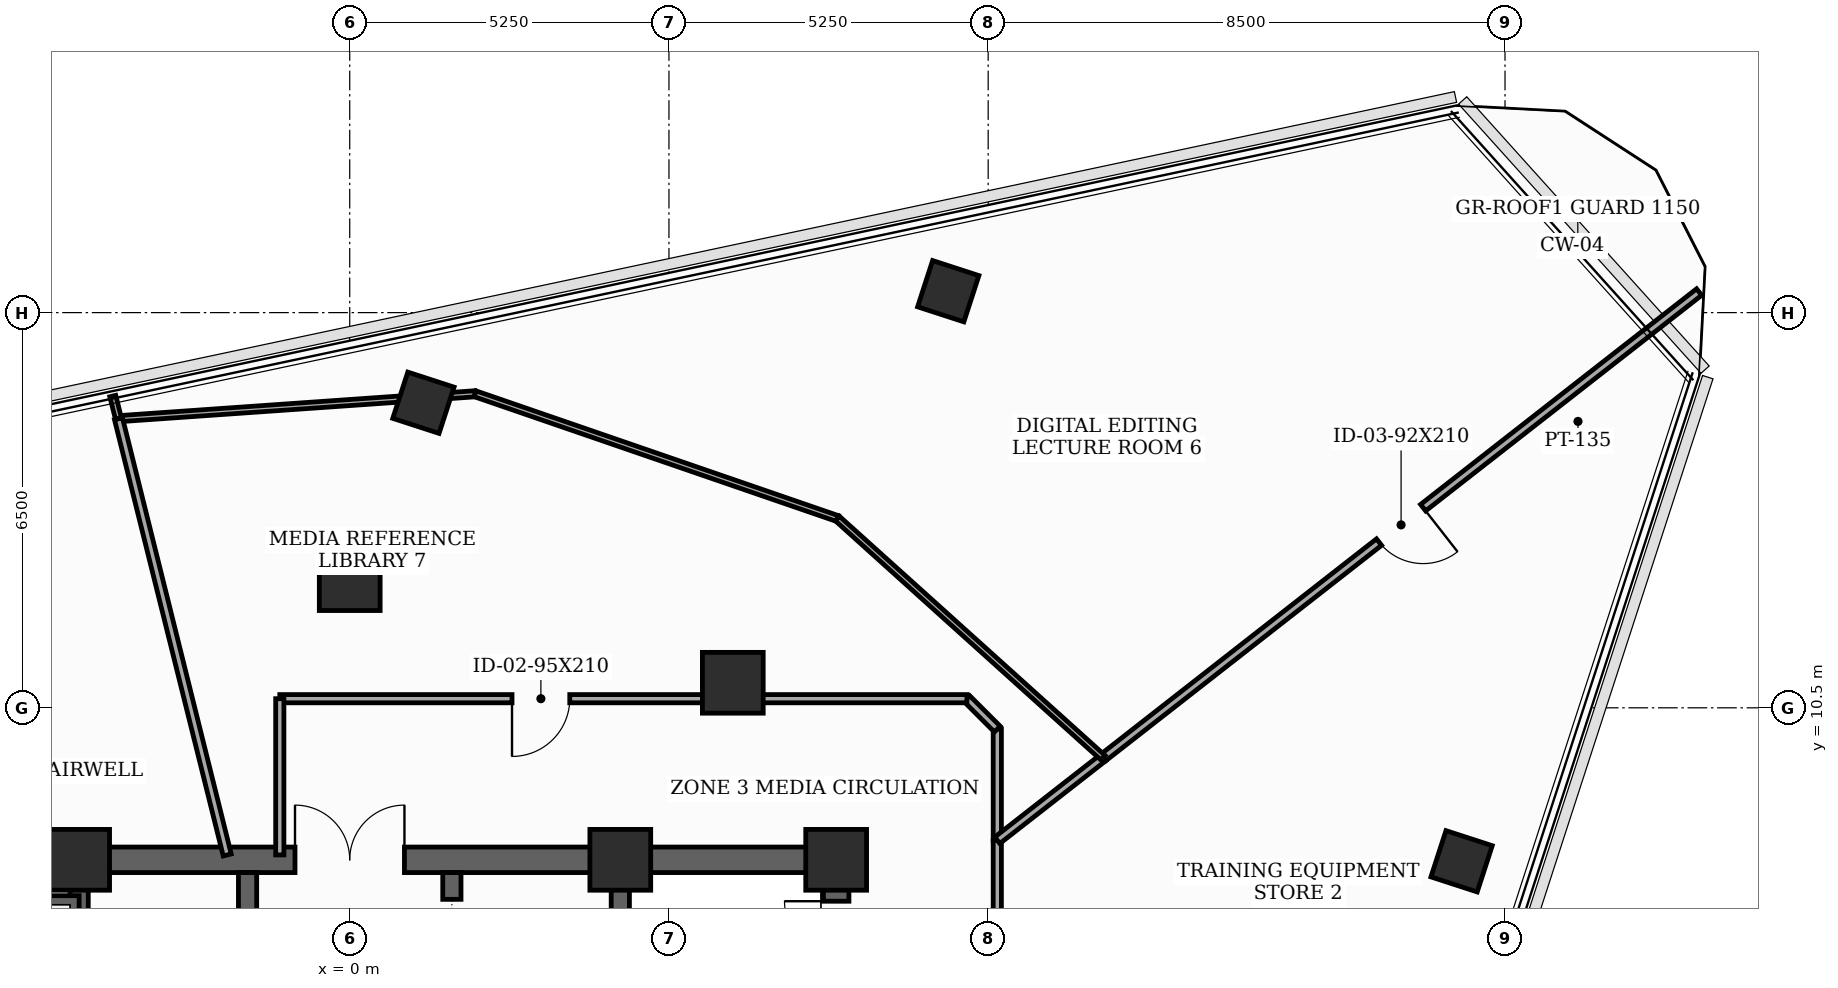
"""IFC4 building model, lengths in metres.
Left out: names, types, materials, properties, quantities, classifications, styles, units other than length and angle.
Written with IfcOpenShell. Run it as: python <this file> out.ifc"""

import sys

from ifc_helpers import new_model, si_unit, direction, frame, frame_2d, origin, origin_2d, place, context, subcontext, project, spatial, rectangle, extrude, element, fill, save


model = new_model("IFC4")
c1 = context("Model", 3, precision=1e-05, world=origin(), true_north=direction((0.0, 1.0)))
c2 = subcontext(c1, "Body", "Model", "MODEL_VIEW")
j1 = project(units=[si_unit("LENGTHUNIT", "METRE"), si_unit("PLANEANGLEUNIT", "RADIAN")], contexts=[c1])
p1 = place(None, origin())
s1 = spatial("IfcSite", under=j1, at=p1, CompositionType="ELEMENT")
p2 = place(p1, origin())
s2 = spatial("IfcBuilding", under=s1, at=p2, CompositionType="ELEMENT")
p3 = place(p2, frame((0.0, 0.0, 286.9)))
s3 = spatial("IfcBuildingStorey", under=s2, at=p3, CompositionType="ELEMENT", Elevation=286.9)
for number, where, z_axis, x_axis in (
    (1, (8.0, 8.0, 0.0), (0.0, 0.0, 1.0), (1.0, 0.0, 0.0)),
    (2, (4.45, 8.0, 0.0), (0.0, 0.0, 1.0), (1.0, 0.0, 0.0)),
    (3, (-4.45, 8.0, 0.0), (0.0, 0.0, 1.0), (1.0, 0.0, 0.0)),
    (4, (6.3, 10.912, 0.0), (0.0, 0.0, 1.0), (1.0, 0.0, 0.0)),
    (5, (0.0, 12.6, 0.0), (0.0, 0.0, 1.0), (1.0, 0.0, 0.0)),
):
    element("IfcColumn", number, at=place(p3, frame(where, z_axis=z_axis, x_axis=x_axis)), inside=s3, PredefinedType="COLUMN", context=c2, shape_type="SweptSolid", body=[
        extrude(rectangle(XDim=1.0, YDim=1.0, at=origin_2d()), origin(), (0.0, 0.0, 1.0), 3.7),
    ])
for number, where, z_axis, x_axis in (
    (6, (18.286, 7.976, 0.0), (0.0, 0.0, 1.0), (0.309, 0.951, 0.0)),
    (7, (9.844, 17.352, 0.0), (0.0, 0.0, 1.0), (0.309, 0.951, 0.0)),
    (8, (1.212, 15.518, 0.0), (0.0, 0.0, 1.0), (0.309, 0.951, 0.0)),
):
    element("IfcColumn", number, at=place(p3, frame(where, z_axis=z_axis, x_axis=x_axis)), inside=s3, PredefinedType="COLUMN", context=c2, shape_type="SweptSolid", body=[
        extrude(rectangle(XDim=0.8, YDim=0.8, at=origin_2d()), origin(), (0.0, 0.0, 1.0), 3.7),
    ])
p4 = place(p3, frame((8.0, -8.0, 0.0), z_axis=(0.0, 0.0, 1.0), x_axis=(0.0, 1.0, 0.0)))
e9 = element("IfcWall", 9, at=p4, inside=s3, PredefinedType="SHEAR", context=c2, shape_type="SweptSolid", body=[
    extrude(rectangle(XDim=16.0, YDim=0.42, at=frame_2d((8.0, 0.0))), origin(), (0.0, 0.0, 1.0), 3.5),
])
p5 = place(p4, frame((9.6, 0.0, 0.0)))
e10 = element("IfcOpeningElement", 10, at=p5, cuts=e9, PredefinedType="OPENING", context=c2, shape_type="SweptSolid", body=[
    extrude(rectangle(XDim=1.05, YDim=2.15, at=frame_2d((0.525, 1.075))), frame((0.0, 0.22, 0.0), z_axis=(0.0, -1.0, 0.0), x_axis=(1.0, 0.0, 0.0)), (0.0, 0.0, 1.0), 0.44),
])
p6 = place(p4, frame((14.469, 0.0, 0.0)))
e11 = element("IfcOpeningElement", 11, at=p6, cuts=e9, PredefinedType="OPENING", context=c2, shape_type="SweptSolid", body=[
    extrude(rectangle(XDim=0.85, YDim=2.02, at=frame_2d((0.425, 1.01))), frame((0.0, 0.22, 0.0), z_axis=(0.0, -1.0, 0.0), x_axis=(1.0, 0.0, 0.0)), (0.0, 0.0, 1.0), 0.44),
])
p7 = place(p3, frame((-8.0, 8.0, 0.0), z_axis=(0.0, 0.0, 1.0), x_axis=(1.0, 0.0, 0.0)))
e12 = element("IfcWall", 12, at=p7, inside=s3, PredefinedType="SHEAR", context=c2, shape_type="SweptSolid", body=[
    extrude(rectangle(XDim=16.0, YDim=0.42, at=frame_2d((8.0, 0.0))), origin(), (0.0, 0.0, 1.0), 3.5),
])
p8 = place(p7, frame((7.1, 0.0, 0.0)))
e13 = element("IfcOpeningElement", 13, at=p8, cuts=e12, PredefinedType="OPENING", context=c2, shape_type="SweptSolid", body=[
    extrude(rectangle(XDim=1.8, YDim=2.15, at=frame_2d((0.9, 1.075))), frame((0.0, 0.22, 0.0), z_axis=(0.0, -1.0, 0.0), x_axis=(1.0, 0.0, 0.0)), (0.0, 0.0, 1.0), 0.44),
])
for number, where, z_axis, x_axis in (
    (14, (-4.45, -7.79, 0.0), (0.0, 0.0, 1.0), (0.0, 1.0, 0.0)),
    (15, (4.45, -7.79, 0.0), (0.0, 0.0, 1.0), (0.0, 1.0, 0.0)),
):
    element("IfcWall", number, at=place(p3, frame(where, z_axis=z_axis, x_axis=x_axis)), inside=s3, PredefinedType="SHEAR", context=c2, shape_type="SweptSolid", body=[
        extrude(rectangle(XDim=15.58, YDim=0.3, at=frame_2d((7.79, 0.0))), origin(), (0.0, 0.0, 1.0), 3.5),
    ])
p9 = place(p3, frame((-7.79, 7.26, 0.0), z_axis=(0.0, 0.0, 1.0), x_axis=(1.0, 0.0, 0.0)))
e16 = element("IfcWall", 16, at=p9, inside=s3, PredefinedType="SHEAR", context=c2, shape_type="SweptSolid", body=[
    extrude(rectangle(XDim=3.34, YDim=0.3, at=frame_2d((1.67, 0.0))), origin(), (0.0, 0.0, 1.0), 3.5),
])
p10 = place(p3, frame((-1.68, -4.85, 0.0), z_axis=(0.0, 0.0, 1.0), x_axis=(0.0, 1.0, 0.0)))
e17 = element("IfcWall", 17, at=p10, inside=s3, PredefinedType="SHEAR", context=c2, shape_type="SweptSolid", body=[
    extrude(rectangle(XDim=12.64, YDim=0.3, at=frame_2d((6.32, 0.0))), origin(), (0.0, 0.0, 1.0), 3.5),
])
p11 = place(p10, frame((2.6, 0.0, 0.0)))
e18 = element("IfcOpeningElement", 18, at=p11, cuts=e17, PredefinedType="OPENING", context=c2, shape_type="SweptSolid", body=[
    extrude(rectangle(XDim=0.95, YDim=2.1, at=frame_2d((0.475, 1.05))), frame((0.0, 0.16, 0.0), z_axis=(0.0, -1.0, 0.0), x_axis=(1.0, 0.0, 0.0)), (0.0, 0.0, 1.0), 0.32),
])
p12 = place(p10, frame((8.8, 0.0, 0.0)))
e19 = element("IfcOpeningElement", 19, at=p12, cuts=e17, PredefinedType="OPENING", context=c2, shape_type="SweptSolid", body=[
    extrude(rectangle(XDim=0.95, YDim=2.1, at=frame_2d((0.475, 1.05))), frame((0.0, 0.16, 0.0), z_axis=(0.0, -1.0, 0.0), x_axis=(1.0, 0.0, 0.0)), (0.0, 0.0, 1.0), 0.32),
])
p13 = place(p3, frame((1.68, -4.85, 0.0), z_axis=(0.0, 0.0, 1.0), x_axis=(0.0, 1.0, 0.0)))
e20 = element("IfcWall", 20, at=p13, inside=s3, PredefinedType="SHEAR", context=c2, shape_type="SweptSolid", body=[
    extrude(rectangle(XDim=12.64, YDim=0.3, at=frame_2d((6.32, 0.0))), origin(), (0.0, 0.0, 1.0), 3.5),
])
p14 = place(p13, frame((0.55, 0.0, 0.0)))
e21 = element("IfcOpeningElement", 21, at=p14, cuts=e20, PredefinedType="OPENING", context=c2, shape_type="SweptSolid", body=[
    extrude(rectangle(XDim=1.1, YDim=2.1, at=frame_2d((0.55, 1.05))), frame((0.0, 0.16, 0.0), z_axis=(0.0, -1.0, 0.0), x_axis=(1.0, 0.0, 0.0)), (0.0, 0.0, 1.0), 0.32),
])
p15 = place(p13, frame((2.65, 0.0, 0.0)))
e22 = element("IfcOpeningElement", 22, at=p15, cuts=e20, PredefinedType="OPENING", context=c2, shape_type="SweptSolid", body=[
    extrude(rectangle(XDim=1.1, YDim=2.1, at=frame_2d((0.55, 1.05))), frame((0.0, 0.16, 0.0), z_axis=(0.0, -1.0, 0.0), x_axis=(1.0, 0.0, 0.0)), (0.0, 0.0, 1.0), 0.32),
])
p16 = place(p13, frame((4.75, 0.0, 0.0)))
e23 = element("IfcOpeningElement", 23, at=p16, cuts=e20, PredefinedType="OPENING", context=c2, shape_type="SweptSolid", body=[
    extrude(rectangle(XDim=1.1, YDim=2.1, at=frame_2d((0.55, 1.05))), frame((0.0, 0.16, 0.0), z_axis=(0.0, -1.0, 0.0), x_axis=(1.0, 0.0, 0.0)), (0.0, 0.0, 1.0), 0.32),
])
p17 = place(p13, frame((8.2, 0.0, 0.0)))
e24 = element("IfcOpeningElement", 24, at=p17, cuts=e20, PredefinedType="OPENING", context=c2, shape_type="SweptSolid", body=[
    extrude(rectangle(XDim=0.95, YDim=2.1, at=frame_2d((0.475, 1.05))), frame((0.0, 0.16, 0.0), z_axis=(0.0, -1.0, 0.0), x_axis=(1.0, 0.0, 0.0)), (0.0, 0.0, 1.0), 0.32),
])
p18 = place(p13, frame((11.25, 0.0, 0.0)))
e25 = element("IfcOpeningElement", 25, at=p18, cuts=e20, PredefinedType="OPENING", context=c2, shape_type="SweptSolid", body=[
    extrude(rectangle(XDim=0.95, YDim=2.1, at=frame_2d((0.475, 1.05))), frame((0.0, 0.16, 0.0), z_axis=(0.0, -1.0, 0.0), x_axis=(1.0, 0.0, 0.0)), (0.0, 0.0, 1.0), 0.32),
])
p19 = place(p3, frame((10.65, 4.225, 0.0), z_axis=(0.0, 0.0, 1.0), x_axis=(0.0, 1.0, 0.0)))
e26 = element("IfcWall", 26, at=p19, inside=s3, PredefinedType="PARTITIONING", context=c2, shape_type="SweptSolid", body=[
    extrude(rectangle(XDim=4.096, YDim=0.135, at=frame_2d((2.048, 0.0))), origin(), (0.0, 0.0, 1.0), 2.885),
])
p20 = place(p3, frame((10.65, 8.321, 0.0), z_axis=(0.0, 0.0, 1.0), x_axis=(0.0, 1.0, 0.0)))
e27 = element("IfcWall", 27, at=p20, inside=s3, PredefinedType="PARTITIONING", context=c2, shape_type="SweptSolid", body=[
    extrude(rectangle(XDim=1.829, YDim=0.135, at=frame_2d((0.915, 0.0))), origin(), (0.0, 0.0, 1.0), 3.5),
])
p21 = place(p3, frame((10.65, 10.15, 0.0), z_axis=(0.0, 0.0, 1.0), x_axis=(-0.707106781187, 0.707106781187, 0.0)))
e28 = element("IfcWall", 28, at=p21, inside=s3, PredefinedType="PARTITIONING", context=c2, shape_type="SweptSolid", body=[
    extrude(rectangle(XDim=0.707, YDim=0.135, at=frame_2d((0.354, 0.0))), origin(), (0.0, 0.0, 1.0), 3.5),
])
p22 = place(p3, frame((10.15, 10.65, 0.0), z_axis=(0.0, 0.0, 1.0), x_axis=(-1.0, 0.0, 0.0)))
e29 = element("IfcWall", 29, at=p22, inside=s3, PredefinedType="PARTITIONING", context=c2, shape_type="SweptSolid", body=[
    extrude(rectangle(XDim=11.3, YDim=0.135, at=frame_2d((5.65, 0.0))), origin(), (0.0, 0.0, 1.0), 2.885),
])
p23 = place(p22, frame((6.531, 0.0, 0.0)))
e30 = element("IfcOpeningElement", 30, at=p23, cuts=e29, PredefinedType="OPENING", context=c2, shape_type="SweptSolid", body=[
    extrude(rectangle(XDim=0.95, YDim=2.1, at=frame_2d((0.475, 1.05))), frame((0.0, 0.077, 0.0), z_axis=(0.0, -1.0, 0.0), x_axis=(1.0, 0.0, 0.0)), (0.0, 0.0, 1.0), 0.155),
])
p24 = place(p3, frame((-1.15, 10.65, 0.0), z_axis=(0.0, 0.0, 1.0), x_axis=(0.0, -1.0, 0.0)))
e31 = element("IfcWall", 31, at=p24, inside=s3, PredefinedType="PARTITIONING", context=c2, shape_type="SweptSolid", body=[
    extrude(rectangle(XDim=2.57, YDim=0.135, at=frame_2d((1.285, 0.0))), origin(), (0.0, 0.0, 1.0), 2.885),
])
p25 = place(p3, frame((22.192, 17.338, 0.0), z_axis=(0.0, 0.0, 1.0), x_axis=(-0.788006224946, -0.615667271703, 0.0)))
e32 = element("IfcWall", 32, at=p25, inside=s3, PredefinedType="PARTITIONING", context=c2, shape_type="SweptSolid", body=[
    extrude(rectangle(XDim=12.441, YDim=0.135, at=frame_2d((6.22, 0.0))), origin(), (0.0, 0.0, 1.0), 3.035),
])
p26 = place(p25, frame((5.76, 0.0, 0.0)))
e33 = element("IfcOpeningElement", 33, at=p26, cuts=e32, PredefinedType="OPENING", context=c2, shape_type="SweptSolid", body=[
    extrude(rectangle(XDim=0.92, YDim=2.1, at=frame_2d((0.46, 1.05))), frame((0.0, 0.077, 0.0), z_axis=(0.0, -1.0, 0.0), x_axis=(1.0, 0.0, 0.0)), (0.0, 0.0, 1.0), 0.155),
])
p27 = place(p3, frame((12.389, 9.679, 0.0), z_axis=(0.0, 0.0, 1.0), x_axis=(-0.788177008199, -0.615448619908, 0.0)))
e34 = element("IfcWall", 34, at=p27, inside=s3, PredefinedType="PARTITIONING", context=c2, shape_type="SweptSolid", body=[
    extrude(rectangle(XDim=2.206, YDim=0.135, at=frame_2d((1.103, 0.0))), origin(), (0.0, 0.0, 1.0), 3.5),
])
p28 = place(p3, frame((-3.803, 15.255, 0.0), z_axis=(0.0, 0.0, 1.0), x_axis=(0.997563622011, 0.069762597718, 0.0)))
e35 = element("IfcWall", 35, at=p28, inside=s3, PredefinedType="MOVABLE", context=c2, shape_type="SweptSolid", body=[
    extrude(rectangle(XDim=5.879, YDim=0.1, at=frame_2d((2.94, 0.0))), origin(), (0.0, 0.0, 1.0), 3.025),
])
p29 = place(p3, frame((2.062, 15.665, 0.0), z_axis=(0.0, 0.0, 1.0), x_axis=(0.94552565825, -0.32554758422, 0.0)))
e36 = element("IfcWall", 36, at=p29, inside=s3, PredefinedType="MOVABLE", context=c2, shape_type="SweptSolid", body=[
    extrude(rectangle(XDim=6.3, YDim=0.1, at=frame_2d((3.15, 0.0))), origin(), (0.0, 0.0, 1.0), 3.025),
])
p30 = place(p3, frame((8.019, 13.614, 0.0), z_axis=(0.0, 0.0, 1.0), x_axis=(0.743110388877, -0.669168850099, 0.0)))
e37 = element("IfcWall", 37, at=p30, inside=s3, PredefinedType="MOVABLE", context=c2, shape_type="SweptSolid", body=[
    extrude(rectangle(XDim=5.881, YDim=0.1, at=frame_2d((2.94, 0.0))), origin(), (0.0, 0.0, 1.0), 3.035),
])
p31 = place(p3, frame((-3.897, 15.628, 0.0), z_axis=(0.0, 0.0, 1.0), x_axis=(0.24388032021, -0.969805335835, 0.0)))
e38 = element("IfcWall", 38, at=p31, inside=s3, PredefinedType="MOVABLE", context=c2, shape_type="SweptSolid", body=[
    extrude(rectangle(XDim=0.385, YDim=0.1, at=frame_2d((0.192, 0.0))), origin(), (0.0, 0.0, 1.0), 3.5),
])
p32 = place(p3, frame((-3.803, 15.255, 0.0), z_axis=(0.0, 0.0, 1.0), x_axis=(0.241851911951, -0.970313172479, 0.0)))
e39 = element("IfcWall", 39, at=p32, inside=s3, PredefinedType="PARTITIONING", context=c2, shape_type="SweptSolid", body=[
    extrude(rectangle(XDim=7.394, YDim=0.135, at=frame_2d((3.697, 0.0))), origin(), (0.0, 0.0, 1.0), 2.885),
])
p33 = place(p6, origin())
e40 = element("IfcDoor", 40, at=p33, inside=s3, OperationType="SINGLE_SWING_RIGHT", PredefinedType="TRAPDOOR", context=c2, shape_type="SweptSolid", body=[
    extrude(rectangle(XDim=0.85, YDim=2.02, at=frame_2d((0.425, 1.01))), frame((0.0, 0.025, 0.0), z_axis=(0.0, -1.0, 0.0), x_axis=(1.0, 0.0, 0.0)), (0.0, 0.0, 1.0), 0.05),
])
fill(e11, e40)
p34 = place(p8, origin())
e41 = element("IfcDoor", 41, at=p34, inside=s3, OperationType="DOUBLE_DOOR_SINGLE_SWING", PredefinedType="DOOR", context=c2, shape_type="SweptSolid", body=[
    extrude(rectangle(XDim=1.8, YDim=2.15, at=frame_2d((0.9, 1.075))), frame((0.0, 0.025, 0.0), z_axis=(0.0, -1.0, 0.0), x_axis=(1.0, 0.0, 0.0)), (0.0, 0.0, 1.0), 0.05),
])
fill(e13, e41)
p35 = place(p18, origin())
e42 = element("IfcDoor", 42, at=p35, inside=s3, OperationType="SLIDING_TO_LEFT", PredefinedType="DOOR", context=c2, shape_type="SweptSolid", body=[
    extrude(rectangle(XDim=0.95, YDim=2.1, at=frame_2d((0.475, 1.05))), frame((0.0, 0.025, 0.0), z_axis=(0.0, -1.0, 0.0), x_axis=(1.0, 0.0, 0.0)), (0.0, 0.0, 1.0), 0.05),
])
fill(e25, e42)
p36 = place(p23, origin())
e43 = element("IfcDoor", 43, at=p36, inside=s3, OperationType="SINGLE_SWING_RIGHT", PredefinedType="DOOR", context=c2, shape_type="SweptSolid", body=[
    extrude(rectangle(XDim=0.95, YDim=2.1, at=frame_2d((0.475, 1.05))), frame((0.0, 0.025, 0.0), z_axis=(0.0, -1.0, 0.0), x_axis=(1.0, 0.0, 0.0)), (0.0, 0.0, 1.0), 0.05),
])
fill(e30, e43)
p37 = place(p26, origin())
e44 = element("IfcDoor", 44, at=p37, inside=s3, OperationType="SINGLE_SWING_LEFT", PredefinedType="DOOR", context=c2, shape_type="SweptSolid", body=[
    extrude(rectangle(XDim=0.92, YDim=2.1, at=frame_2d((0.46, 1.05))), frame((0.0, 0.025, 0.0), z_axis=(0.0, -1.0, 0.0), x_axis=(1.0, 0.0, 0.0)), (0.0, 0.0, 1.0), 0.05),
])
fill(e33, e44)
save(model, sys.argv[1])
